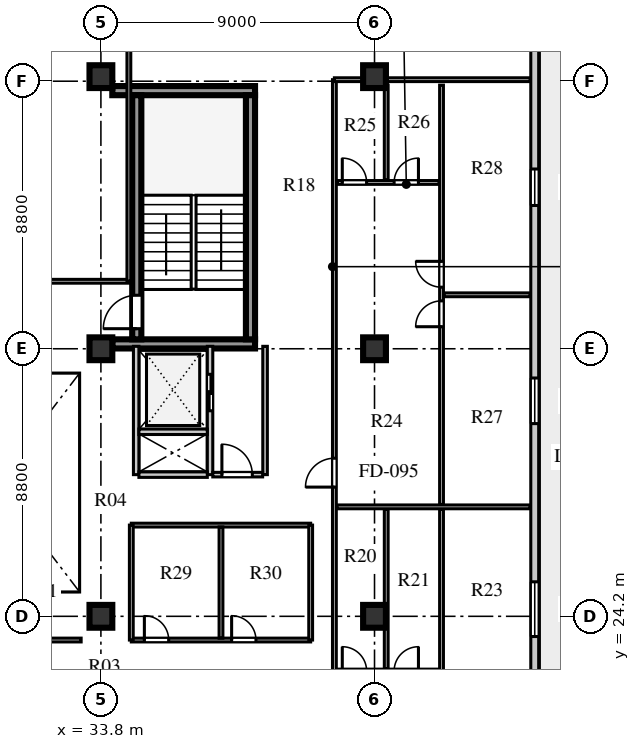
"""IFC4 building model, lengths in metres.
Left out: names, types, materials, properties, quantities, classifications, styles, units other than length and angle.
Written with IfcOpenShell. Run it as: python <this file> out.ifc"""

import sys

from ifc_helpers import new_model, si_unit, direction, frame, frame_2d, origin, origin_2d, place, context, subcontext, project, spatial, rectangle, extrude, element, fill, save


model = new_model("IFC4")
c1 = context("Model", 3, precision=1e-05, world=origin(), true_north=direction((0.0, 1.0)))
c2 = subcontext(c1, "Body", "Model", "MODEL_VIEW")
j1 = project(units=[si_unit("LENGTHUNIT", "METRE"), si_unit("PLANEANGLEUNIT", "RADIAN")], contexts=[c1])
p1 = place(None, origin())
s1 = spatial("IfcSite", under=j1, at=p1, CompositionType="ELEMENT")
p2 = place(p1, origin())
s2 = spatial("IfcBuilding", under=s1, at=p2, CompositionType="ELEMENT")
p3 = place(p2, frame((0.0, 0.0, 280.4)))
s3 = spatial("IfcBuildingStorey", under=s2, at=p3, CompositionType="ELEMENT", Elevation=280.4)
for number, where, z_axis, x_axis in (
    (1, (34.175, 33.16, 0.0), (0.0, 0.0, 1.0), (1.0, 0.0, 0.0)),
    (2, (34.175, 41.49, 0.0), (0.0, 0.0, 1.0), (1.0, 0.0, 0.0)),
):
    element("IfcWall", number, at=place(p3, frame(where, z_axis=z_axis, x_axis=x_axis)), inside=s3, PredefinedType="SHEAR", context=c2, shape_type="SweptSolid", body=[
        extrude(rectangle(XDim=4.695, YDim=0.3, at=frame_2d((2.348, 0.0))), origin(), (0.0, 0.0, 1.0), 3.66),
    ])
p4 = place(p3, frame((34.98, 33.31, 0.0), z_axis=(0.0, 0.0, 1.0), x_axis=(0.0, 1.0, 0.0)))
e3 = element("IfcWall", 3, at=p4, inside=s3, PredefinedType="SHEAR", context=c2, shape_type="SweptSolid", body=[
    extrude(rectangle(XDim=8.03, YDim=0.3, at=frame_2d((4.015, 0.0))), origin(), (0.0, 0.0, 1.0), 3.66),
])
p5 = place(p4, frame((0.35, 0.0, 0.0)))
e4 = element("IfcOpeningElement", 4, at=p5, cuts=e3, PredefinedType="OPENING", context=c2, shape_type="SweptSolid", body=[
    extrude(rectangle(XDim=1.1, YDim=2.1, at=frame_2d((0.55, 1.05))), frame((0.0, 0.16, 0.0), z_axis=(0.0, -1.0, 0.0), x_axis=(1.0, 0.0, 0.0)), (0.0, 0.0, 1.0), 0.32),
])
p6 = place(p3, frame((38.72, 33.31, 0.0), z_axis=(0.0, 0.0, 1.0), x_axis=(0.0, 1.0, 0.0)))
e5 = element("IfcWall", 5, at=p6, inside=s3, PredefinedType="SHEAR", context=c2, shape_type="SweptSolid", body=[
    extrude(rectangle(XDim=8.03, YDim=0.3, at=frame_2d((4.015, 0.0))), origin(), (0.0, 0.0, 1.0), 3.66),
])
for number, where, z_axis, x_axis in (
    (6, (33.8, 24.2, 0.0), (0.0, 0.0, 1.0), (1.0, 0.0, 0.0)),
    (7, (33.8, 33.0, 0.0), (0.0, 0.0, 1.0), (1.0, 0.0, 0.0)),
    (8, (33.8, 41.95, 0.0), (0.0, 0.0, 1.0), (1.0, 0.0, 0.0)),
    (9, (42.8, 24.2, 0.0), (0.0, 0.0, 1.0), (1.0, 0.0, 0.0)),
    (10, (42.8, 33.0, 0.0), (0.0, 0.0, 1.0), (1.0, 0.0, 0.0)),
    (11, (42.8, 41.95, 0.0), (0.0, 0.0, 1.0), (1.0, 0.0, 0.0)),
):
    element("IfcColumn", number, at=place(p3, frame(where, z_axis=z_axis, x_axis=x_axis)), inside=s3, PredefinedType="COLUMN", context=c2, shape_type="SweptSolid", body=[
        extrude(rectangle(XDim=0.75, YDim=0.75, at=origin_2d()), origin(), (0.0, 0.0, 1.0), 3.66),
    ])
p7 = place(p3, frame((48.07, 13.41, 0.0), z_axis=(0.0, 0.0, 1.0), x_axis=(0.0, 1.0, 0.0)))
e12 = element("IfcWall", 12, at=p7, inside=s3, PredefinedType="SOLIDWALL", context=c2, shape_type="SweptSolid", body=[
    extrude(rectangle(XDim=30.38, YDim=0.26, at=frame_2d((15.19, 0.0))), origin(), (0.0, 0.0, 1.0), 3.66),
])
p8 = place(p7, frame((2.43, 0.0, 0.0)))
e13 = element("IfcOpeningElement", 13, at=p8, cuts=e12, PredefinedType="OPENING", context=c2, shape_type="SweptSolid", body=[
    extrude(rectangle(XDim=1.0, YDim=2.05, at=frame_2d((0.5, 1.025))), frame((0.0, 0.14, 0.0), z_axis=(0.0, -1.0, 0.0), x_axis=(1.0, 0.0, 0.0)), (0.0, 0.0, 1.0), 0.28),
])
p9 = place(p7, frame((4.45, 0.0, 0.8)))
e14 = element("IfcOpeningElement", 14, at=p9, cuts=e12, PredefinedType="OPENING", context=c2, shape_type="SweptSolid", body=[
    extrude(rectangle(XDim=2.25, YDim=2.0, at=frame_2d((1.125, 1.0))), frame((0.0, 0.14, 0.0), z_axis=(0.0, -1.0, 0.0), x_axis=(1.0, 0.0, 0.0)), (0.0, 0.0, 1.0), 0.28),
])
p10 = place(p7, frame((10.125, 0.0, 0.8)))
e15 = element("IfcOpeningElement", 15, at=p10, cuts=e12, PredefinedType="OPENING", context=c2, shape_type="SweptSolid", body=[
    extrude(rectangle(XDim=1.8, YDim=2.0, at=frame_2d((0.9, 1.0))), frame((0.0, 0.14, 0.0), z_axis=(0.0, -1.0, 0.0), x_axis=(1.0, 0.0, 0.0)), (0.0, 0.0, 1.0), 0.28),
])
p11 = place(p7, frame((17.128, 0.0, 0.8)))
e16 = element("IfcOpeningElement", 16, at=p11, cuts=e12, PredefinedType="OPENING", context=c2, shape_type="SweptSolid", body=[
    extrude(rectangle(XDim=1.5, YDim=2.0, at=frame_2d((0.75, 1.0))), frame((0.0, 0.14, 0.0), z_axis=(0.0, -1.0, 0.0), x_axis=(1.0, 0.0, 0.0)), (0.0, 0.0, 1.0), 0.28),
])
p12 = place(p7, frame((24.302, 0.0, 0.8)))
e17 = element("IfcOpeningElement", 17, at=p12, cuts=e12, PredefinedType="OPENING", context=c2, shape_type="SweptSolid", body=[
    extrude(rectangle(XDim=1.2, YDim=1.75, at=frame_2d((0.6, 0.875))), frame((0.0, 0.14, 0.0), z_axis=(0.0, -1.0, 0.0), x_axis=(1.0, 0.0, 0.0)), (0.0, 0.0, 1.0), 0.28),
])
p13 = place(p3, frame((34.96, 28.86, 0.0), z_axis=(0.0, 0.0, 1.0), x_axis=(0.0, 1.0, 0.0)))
e18 = element("IfcWall", 18, at=p13, inside=s3, PredefinedType="SOLIDWALL", context=c2, shape_type="SweptSolid", body=[
    extrude(rectangle(XDim=4.22, YDim=0.18, at=frame_2d((2.11, 0.0))), origin(), (0.0, 0.0, 1.0), 3.66),
])
p14 = place(p3, frame((37.39, 28.86, 0.0), z_axis=(0.0, 0.0, 1.0), x_axis=(0.0, 1.0, 0.0)))
e19 = element("IfcWall", 19, at=p14, inside=s3, PredefinedType="SOLIDWALL", context=c2, shape_type="SweptSolid", body=[
    extrude(rectangle(XDim=4.22, YDim=0.18, at=frame_2d((2.11, 0.0))), origin(), (0.0, 0.0, 1.0), 3.66),
])
p15 = place(p14, frame((2.1, 0.0, 0.0)))
e20 = element("IfcOpeningElement", 20, at=p15, cuts=e19, PredefinedType="OPENING", context=c2, shape_type="SweptSolid", body=[
    extrude(rectangle(XDim=1.2, YDim=2.12, at=frame_2d((0.6, 1.06))), frame((0.0, 0.1, 0.0), z_axis=(0.0, -1.0, 0.0), x_axis=(1.0, 0.0, 0.0)), (0.0, 0.0, 1.0), 0.2),
])
for number, where, z_axis, x_axis in (
    (21, (35.05, 28.86, 0.0), (0.0, 0.0, 1.0), (1.0, 0.0, 0.0)),
    (22, (35.05, 30.27, 0.0), (0.0, 0.0, 1.0), (1.0, 0.0, 0.0)),
):
    element("IfcWall", number, at=place(p3, frame(where, z_axis=z_axis, x_axis=x_axis)), inside=s3, PredefinedType="SOLIDWALL", context=c2, shape_type="SweptSolid", body=[
        extrude(rectangle(XDim=2.25, YDim=0.18, at=frame_2d((1.125, 0.0))), origin(), (0.0, 0.0, 1.0), 3.66),
    ])
p16 = place(p3, frame((39.2, 28.86, 0.0), z_axis=(0.0, 0.0, 1.0), x_axis=(0.0, 1.0, 0.0)))
e23 = element("IfcWall", 23, at=p16, inside=s3, PredefinedType="PARTITIONING", context=c2, shape_type="SweptSolid", body=[
    extrude(rectangle(XDim=4.22, YDim=0.15, at=frame_2d((2.11, 0.0))), origin(), (0.0, 0.0, 1.0), 3.66),
])
p17 = place(p3, frame((37.48, 28.86, 0.0), z_axis=(0.0, 0.0, 1.0), x_axis=(1.0, 0.0, 0.0)))
e24 = element("IfcWall", 24, at=p17, inside=s3, PredefinedType="PARTITIONING", context=c2, shape_type="SweptSolid", body=[
    extrude(rectangle(XDim=1.64, YDim=0.15, at=frame_2d((0.82, 0.0))), origin(), (0.0, 0.0, 1.0), 3.66),
])
p18 = place(p17, frame((0.3, 0.0, 0.0)))
e25 = element("IfcOpeningElement", 25, at=p18, cuts=e24, PredefinedType="OPENING", context=c2, shape_type="SweptSolid", body=[
    extrude(rectangle(XDim=1.0, YDim=2.1, at=frame_2d((0.5, 1.05))), frame((0.0, 0.085, 0.0), z_axis=(0.0, -1.0, 0.0), x_axis=(1.0, 0.0, 0.0)), (0.0, 0.0, 1.0), 0.17),
])
p19 = place(p3, frame((27.15, 23.42, 0.0), z_axis=(0.0, 0.0, 1.0), x_axis=(1.0, 0.0, 0.0)))
e26 = element("IfcWall", 26, at=p19, inside=s3, PredefinedType="PLUMBINGWALL", context=c2, shape_type="SweptSolid", body=[
    extrude(rectangle(XDim=6.0, YDim=0.125, at=frame_2d((3.0, 0.0))), origin(), (0.0, 0.0, 1.0), 3.66),
])
p20 = place(p3, frame((25.22, 35.22, 0.0), z_axis=(0.0, 0.0, 1.0), x_axis=(1.0, 0.0, 0.0)))
e27 = element("IfcWall", 27, at=p20, inside=s3, PredefinedType="PLUMBINGWALL", context=c2, shape_type="SweptSolid", body=[
    extrude(rectangle(XDim=9.5, YDim=0.125, at=frame_2d((4.75, 0.0))), origin(), (0.0, 0.0, 1.0), 3.66),
])
p21 = place(p20, frame((1.8, 0.0, 0.0)))
e28 = element("IfcOpeningElement", 28, at=p21, cuts=e27, PredefinedType="OPENING", context=c2, shape_type="SweptSolid", body=[
    extrude(rectangle(XDim=1.1, YDim=2.08, at=frame_2d((0.55, 1.04))), frame((0.0, 0.073, 0.0), z_axis=(0.0, -1.0, 0.0), x_axis=(1.0, 0.0, 0.0)), (0.0, 0.0, 1.0), 0.145),
])
p22 = place(p3, frame((34.72, 35.22, 0.0), z_axis=(0.0, 0.0, 1.0), x_axis=(0.0, 1.0, 0.0)))
e29 = element("IfcWall", 29, at=p22, inside=s3, PredefinedType="PLUMBINGWALL", context=c2, shape_type="SweptSolid", body=[
    extrude(rectangle(XDim=11.6, YDim=0.125, at=frame_2d((5.8, 0.0))), origin(), (0.0, 0.0, 1.0), 3.66),
])
p23 = place(p3, frame((41.48, 15.35, 0.0), z_axis=(0.0, 0.0, 1.0), x_axis=(0.0, 1.0, 0.0)))
e30 = element("IfcWall", 30, at=p23, inside=s3, PredefinedType="PLUMBINGWALL", context=c2, shape_type="SweptSolid", body=[
    extrude(rectangle(XDim=26.5, YDim=0.125, at=frame_2d((13.25, 0.0))), origin(), (0.0, 0.0, 1.0), 3.66),
])
p24 = place(p23, frame((0.75, 0.0, 0.0)))
e31 = element("IfcOpeningElement", 31, at=p24, cuts=e30, PredefinedType="OPENING", context=c2, shape_type="SweptSolid", body=[
    extrude(rectangle(XDim=0.95, YDim=2.1, at=frame_2d((0.475, 1.05))), frame((0.0, 0.073, 0.0), z_axis=(0.0, -1.0, 0.0), x_axis=(1.0, 0.0, 0.0)), (0.0, 0.0, 1.0), 0.145),
])
p25 = place(p23, frame((13.1, 0.0, 0.0)))
e32 = element("IfcOpeningElement", 32, at=p25, cuts=e30, PredefinedType="OPENING", context=c2, shape_type="SweptSolid", body=[
    extrude(rectangle(XDim=0.95, YDim=2.1, at=frame_2d((0.475, 1.05))), frame((0.0, 0.073, 0.0), z_axis=(0.0, -1.0, 0.0), x_axis=(1.0, 0.0, 0.0)), (0.0, 0.0, 1.0), 0.145),
])
p26 = place(p3, frame((41.48, 41.85, 0.0), z_axis=(0.0, 0.0, 1.0), x_axis=(1.0, 0.0, 0.0)))
e33 = element("IfcWall", 33, at=p26, inside=s3, PredefinedType="PLUMBINGWALL", context=c2, shape_type="SweptSolid", body=[
    extrude(rectangle(XDim=6.44, YDim=0.125, at=frame_2d((3.22, 0.0))), origin(), (0.0, 0.0, 1.0), 3.06),
])
p27 = place(p3, frame((45.004, 15.53, 0.0), z_axis=(0.0, 0.0, 1.0), x_axis=(0.0, 1.0, 0.0)))
e34 = element("IfcWall", 34, at=p27, inside=s3, PredefinedType="PLUMBINGWALL", context=c2, shape_type="SweptSolid", body=[
    extrude(rectangle(XDim=12.19, YDim=0.125, at=frame_2d((6.095, 0.0))), origin(), (0.0, 0.0, 1.0), 3.66),
])
p28 = place(p27, frame((4.49, 0.0, 0.0)))
e35 = element("IfcOpeningElement", 35, at=p28, cuts=e34, PredefinedType="OPENING", context=c2, shape_type="SweptSolid", body=[
    extrude(rectangle(XDim=0.85, YDim=2.08, at=frame_2d((0.425, 1.04))), frame((0.0, 0.073, 0.0), z_axis=(0.0, -1.0, 0.0), x_axis=(1.0, 0.0, 0.0)), (0.0, 0.0, 1.0), 0.145),
])
p29 = place(p27, frame((5.79, 0.0, 0.0)))
e36 = element("IfcOpeningElement", 36, at=p29, cuts=e34, PredefinedType="OPENING", context=c2, shape_type="SweptSolid", body=[
    extrude(rectangle(XDim=0.85, YDim=2.08, at=frame_2d((0.425, 1.04))), frame((0.0, 0.073, 0.0), z_axis=(0.0, -1.0, 0.0), x_axis=(1.0, 0.0, 0.0)), (0.0, 0.0, 1.0), 0.145),
])
p30 = place(p3, frame((41.58, 22.4, 0.0), z_axis=(0.0, 0.0, 1.0), x_axis=(1.0, 0.0, 0.0)))
e37 = element("IfcWall", 37, at=p30, inside=s3, PredefinedType="PLUMBINGWALL", context=c2, shape_type="SweptSolid", body=[
    extrude(rectangle(XDim=3.344, YDim=0.125, at=frame_2d((1.672, 0.0))), origin(), (0.0, 0.0, 1.0), 3.66),
])
p31 = place(p30, frame((0.16, 0.0, 0.0)))
e38 = element("IfcOpeningElement", 38, at=p31, cuts=e37, PredefinedType="OPENING", context=c2, shape_type="SweptSolid", body=[
    extrude(rectangle(XDim=0.8, YDim=2.05, at=frame_2d((0.4, 1.025))), frame((0.0, 0.073, 0.0), z_axis=(0.0, -1.0, 0.0), x_axis=(1.0, 0.0, 0.0)), (0.0, 0.0, 1.0), 0.145),
])
p32 = place(p30, frame((1.865, 0.0, 0.0)))
e39 = element("IfcOpeningElement", 39, at=p32, cuts=e37, PredefinedType="OPENING", context=c2, shape_type="SweptSolid", body=[
    extrude(rectangle(XDim=0.8, YDim=2.05, at=frame_2d((0.4, 1.025))), frame((0.0, 0.073, 0.0), z_axis=(0.0, -1.0, 0.0), x_axis=(1.0, 0.0, 0.0)), (0.0, 0.0, 1.0), 0.145),
])
p33 = place(p3, frame((43.185, 22.48, 0.0), z_axis=(0.0, 0.0, 1.0), x_axis=(0.0, 1.0, 0.0)))
e40 = element("IfcWall", 40, at=p33, inside=s3, PredefinedType="PLUMBINGWALL", context=c2, shape_type="SweptSolid", body=[
    extrude(rectangle(XDim=5.24, YDim=0.125, at=frame_2d((2.62, 0.0))), origin(), (0.0, 0.0, 1.0), 3.66),
])
p34 = place(p3, frame((41.56, 27.8, 0.0), z_axis=(0.0, 0.0, 1.0), x_axis=(1.0, 0.0, 0.0)))
e41 = element("IfcWall", 41, at=p34, inside=s3, PredefinedType="PLUMBINGWALL", context=c2, shape_type="SweptSolid", body=[
    extrude(rectangle(XDim=6.36, YDim=0.125, at=frame_2d((3.18, 0.0))), origin(), (0.0, 0.0, 1.0), 3.66),
])
p35 = place(p3, frame((45.004, 27.88, 0.0), z_axis=(0.0, 0.0, 1.0), x_axis=(0.0, 1.0, 0.0)))
e42 = element("IfcWall", 42, at=p35, inside=s3, PredefinedType="PLUMBINGWALL", context=c2, shape_type="SweptSolid", body=[
    extrude(rectangle(XDim=13.79, YDim=0.125, at=frame_2d((6.895, 0.0))), origin(), (0.0, 0.0, 1.0), 3.66),
])
p36 = place(p35, frame((5.845, 0.0, 0.0)))
e43 = element("IfcOpeningElement", 43, at=p36, cuts=e42, PredefinedType="OPENING", context=c2, shape_type="SweptSolid", body=[
    extrude(rectangle(XDim=0.85, YDim=2.08, at=frame_2d((0.425, 1.04))), frame((0.0, 0.073, 0.0), z_axis=(0.0, -1.0, 0.0), x_axis=(1.0, 0.0, 0.0)), (0.0, 0.0, 1.0), 0.145),
])
p37 = place(p35, frame((7.145, 0.0, 0.0)))
e44 = element("IfcOpeningElement", 44, at=p37, cuts=e42, PredefinedType="OPENING", context=c2, shape_type="SweptSolid", body=[
    extrude(rectangle(XDim=0.85, YDim=2.08, at=frame_2d((0.425, 1.04))), frame((0.0, 0.073, 0.0), z_axis=(0.0, -1.0, 0.0), x_axis=(1.0, 0.0, 0.0)), (0.0, 0.0, 1.0), 0.145),
])
p38 = place(p3, frame((41.58, 38.47, 0.0), z_axis=(0.0, 0.0, 1.0), x_axis=(1.0, 0.0, 0.0)))
e45 = element("IfcWall", 45, at=p38, inside=s3, PredefinedType="PLUMBINGWALL", context=c2, shape_type="SweptSolid", body=[
    extrude(rectangle(XDim=3.344, YDim=0.125, at=frame_2d((1.672, 0.0))), origin(), (0.0, 0.0, 1.0), 3.66),
])
p39 = place(p38, frame((0.16, 0.0, 0.0)))
e46 = element("IfcOpeningElement", 46, at=p39, cuts=e45, PredefinedType="OPENING", context=c2, shape_type="SweptSolid", body=[
    extrude(rectangle(XDim=0.8, YDim=2.05, at=frame_2d((0.4, 1.025))), frame((0.0, 0.073, 0.0), z_axis=(0.0, -1.0, 0.0), x_axis=(1.0, 0.0, 0.0)), (0.0, 0.0, 1.0), 0.145),
])
p40 = place(p38, frame((1.865, 0.0, 0.0)))
e47 = element("IfcOpeningElement", 47, at=p40, cuts=e45, PredefinedType="OPENING", context=c2, shape_type="SweptSolid", body=[
    extrude(rectangle(XDim=0.8, YDim=2.05, at=frame_2d((0.4, 1.025))), frame((0.0, 0.073, 0.0), z_axis=(0.0, -1.0, 0.0), x_axis=(1.0, 0.0, 0.0)), (0.0, 0.0, 1.0), 0.145),
])
p41 = place(p3, frame((43.185, 38.55, 0.0), z_axis=(0.0, 0.0, 1.0), x_axis=(0.0, 1.0, 0.0)))
e48 = element("IfcWall", 48, at=p41, inside=s3, PredefinedType="PLUMBINGWALL", context=c2, shape_type="SweptSolid", body=[
    extrude(rectangle(XDim=3.12, YDim=0.125, at=frame_2d((1.56, 0.0))), origin(), (0.0, 0.0, 1.0), 3.66),
])
p42 = place(p3, frame((45.084, 34.775, 0.0), z_axis=(0.0, 0.0, 1.0), x_axis=(1.0, 0.0, 0.0)))
e49 = element("IfcWall", 49, at=p42, inside=s3, PredefinedType="PLUMBINGWALL", context=c2, shape_type="SweptSolid", body=[
    extrude(rectangle(XDim=2.836, YDim=0.125, at=frame_2d((1.418, 0.0))), origin(), (0.0, 0.0, 1.0), 3.66),
])
p43 = place(p3, frame((34.8, 23.42, 0.0), z_axis=(0.0, 0.0, 1.0), x_axis=(1.0, 0.0, 0.0)))
e50 = element("IfcWall", 50, at=p43, inside=s3, PredefinedType="PLUMBINGWALL", context=c2, shape_type="SweptSolid", body=[
    extrude(rectangle(XDim=5.9, YDim=0.125, at=frame_2d((2.95, 0.0))), origin(), (0.0, 0.0, 1.0), 3.66),
])
p44 = place(p43, frame((0.43, 0.0, 0.0)))
e51 = element("IfcOpeningElement", 51, at=p44, cuts=e50, PredefinedType="OPENING", context=c2, shape_type="SweptSolid", body=[
    extrude(rectangle(XDim=0.8, YDim=2.05, at=frame_2d((0.4, 1.025))), frame((0.0, 0.073, 0.0), z_axis=(0.0, -1.0, 0.0), x_axis=(1.0, 0.0, 0.0)), (0.0, 0.0, 1.0), 0.145),
])
p45 = place(p43, frame((3.3, 0.0, 0.0)))
e52 = element("IfcOpeningElement", 52, at=p45, cuts=e50, PredefinedType="OPENING", context=c2, shape_type="SweptSolid", body=[
    extrude(rectangle(XDim=0.8, YDim=2.05, at=frame_2d((0.4, 1.025))), frame((0.0, 0.073, 0.0), z_axis=(0.0, -1.0, 0.0), x_axis=(1.0, 0.0, 0.0)), (0.0, 0.0, 1.0), 0.145),
])
p46 = place(p3, frame((34.8, 27.2, 0.0), z_axis=(0.0, 0.0, 1.0), x_axis=(1.0, 0.0, 0.0)))
e53 = element("IfcWall", 53, at=p46, inside=s3, PredefinedType="PLUMBINGWALL", context=c2, shape_type="SweptSolid", body=[
    extrude(rectangle(XDim=5.9, YDim=0.125, at=frame_2d((2.95, 0.0))), origin(), (0.0, 0.0, 1.0), 3.36),
])
for number, where, z_axis, x_axis in (
    (54, (34.8, 23.42, 0.0), (0.0, 0.0, 1.0), (0.0, 1.0, 0.0)),
    (55, (40.7, 23.42, 0.0), (0.0, 0.0, 1.0), (0.0, 1.0, 0.0)),
):
    element("IfcWall", number, at=place(p3, frame(where, z_axis=z_axis, x_axis=x_axis)), inside=s3, PredefinedType="PLUMBINGWALL", context=c2, shape_type="SweptSolid", body=[
        extrude(rectangle(XDim=3.78, YDim=0.125, at=frame_2d((1.89, 0.0))), origin(), (0.0, 0.0, 1.0), 3.66),
    ])
p47 = place(p3, frame((37.75, 23.48, 0.0), z_axis=(0.0, 0.0, 1.0), x_axis=(0.0, 1.0, 0.0)))
e56 = element("IfcWall", 56, at=p47, inside=s3, PredefinedType="PLUMBINGWALL", context=c2, shape_type="SweptSolid", body=[
    extrude(rectangle(XDim=3.66, YDim=0.125, at=frame_2d((1.83, 0.0))), origin(), (0.0, 0.0, 1.0), 3.66),
])
p48 = place(p10, origin())
e57 = element("IfcWindow", 57, at=p48, inside=s3, PartitioningType="SINGLE_PANEL", PredefinedType="WINDOW", context=c2, shape_type="SweptSolid", body=[
    extrude(rectangle(XDim=1.8, YDim=2.0, at=frame_2d((0.9, 1.0))), frame((0.0, 0.03, 0.0), z_axis=(0.0, -1.0, 0.0), x_axis=(1.0, 0.0, 0.0)), (0.0, 0.0, 1.0), 0.06),
])
fill(e15, e57)
p49 = place(p11, origin())
e58 = element("IfcWindow", 58, at=p49, inside=s3, PartitioningType="SINGLE_PANEL", PredefinedType="WINDOW", context=c2, shape_type="SweptSolid", body=[
    extrude(rectangle(XDim=1.5, YDim=2.0, at=frame_2d((0.75, 1.0))), frame((0.0, 0.03, 0.0), z_axis=(0.0, -1.0, 0.0), x_axis=(1.0, 0.0, 0.0)), (0.0, 0.0, 1.0), 0.06),
])
fill(e16, e58)
p50 = place(p12, origin())
e59 = element("IfcWindow", 59, at=p50, inside=s3, PartitioningType="SINGLE_PANEL", PredefinedType="WINDOW", context=c2, shape_type="SweptSolid", body=[
    extrude(rectangle(XDim=1.2, YDim=1.75, at=frame_2d((0.6, 0.875))), frame((0.0, 0.03, 0.0), z_axis=(0.0, -1.0, 0.0), x_axis=(1.0, 0.0, 0.0)), (0.0, 0.0, 1.0), 0.06),
])
fill(e17, e59)
p51 = place(p5, origin())
e60 = element("IfcDoor", 60, at=p51, inside=s3, OperationType="SINGLE_SWING_LEFT", PredefinedType="DOOR", context=c2, shape_type="SweptSolid", body=[
    extrude(rectangle(XDim=1.1, YDim=2.1, at=frame_2d((0.55, 1.05))), frame((0.0, 0.025, 0.0), z_axis=(0.0, -1.0, 0.0), x_axis=(1.0, 0.0, 0.0)), (0.0, 0.0, 1.0), 0.05),
])
fill(e4, e60)
p52 = place(p15, frame((1.2, 0.0, 0.0), z_axis=(0.0, 0.0, 1.0), x_axis=(-1.0, 0.0, 0.0)))
e61 = element("IfcDoor", 61, at=p52, inside=s3, OperationType="DOUBLE_DOOR_SLIDING", PredefinedType="DOOR", context=c2, shape_type="SweptSolid", body=[
    extrude(rectangle(XDim=1.2, YDim=2.12, at=frame_2d((0.6, 1.06))), frame((0.0, 0.025, 0.0), z_axis=(0.0, -1.0, 0.0), x_axis=(1.0, 0.0, 0.0)), (0.0, 0.0, 1.0), 0.05),
])
fill(e20, e61)
p53 = place(p18, origin())
e62 = element("IfcDoor", 62, at=p53, inside=s3, OperationType="SINGLE_SWING_LEFT", PredefinedType="DOOR", context=c2, shape_type="SweptSolid", body=[
    extrude(rectangle(XDim=1.0, YDim=2.1, at=frame_2d((0.5, 1.05))), frame((0.0, 0.025, 0.0), z_axis=(0.0, -1.0, 0.0), x_axis=(1.0, 0.0, 0.0)), (0.0, 0.0, 1.0), 0.05),
])
fill(e25, e62)
p54 = place(p39, origin())
e63 = element("IfcDoor", 63, at=p54, inside=s3, OperationType="SINGLE_SWING_LEFT", PredefinedType="DOOR", context=c2, shape_type="SweptSolid", body=[
    extrude(rectangle(XDim=0.8, YDim=2.05, at=frame_2d((0.4, 1.025))), frame((0.0, 0.025, 0.0), z_axis=(0.0, -1.0, 0.0), x_axis=(1.0, 0.0, 0.0)), (0.0, 0.0, 1.0), 0.05),
])
fill(e46, e63)
p55 = place(p40, origin())
e64 = element("IfcDoor", 64, at=p55, inside=s3, OperationType="SINGLE_SWING_RIGHT", PredefinedType="DOOR", context=c2, shape_type="SweptSolid", body=[
    extrude(rectangle(XDim=0.8, YDim=2.05, at=frame_2d((0.4, 1.025))), frame((0.0, 0.025, 0.0), z_axis=(0.0, -1.0, 0.0), x_axis=(1.0, 0.0, 0.0)), (0.0, 0.0, 1.0), 0.05),
])
fill(e47, e64)
p56 = place(p36, origin())
e65 = element("IfcDoor", 65, at=p56, inside=s3, OperationType="SINGLE_SWING_LEFT", PredefinedType="DOOR", context=c2, shape_type="SweptSolid", body=[
    extrude(rectangle(XDim=0.85, YDim=2.08, at=frame_2d((0.425, 1.04))), frame((0.0, 0.025, 0.0), z_axis=(0.0, -1.0, 0.0), x_axis=(1.0, 0.0, 0.0)), (0.0, 0.0, 1.0), 0.05),
])
fill(e43, e65)
p57 = place(p37, origin())
e66 = element("IfcDoor", 66, at=p57, inside=s3, OperationType="SINGLE_SWING_RIGHT", PredefinedType="DOOR", context=c2, shape_type="SweptSolid", body=[
    extrude(rectangle(XDim=0.85, YDim=2.08, at=frame_2d((0.425, 1.04))), frame((0.0, 0.025, 0.0), z_axis=(0.0, -1.0, 0.0), x_axis=(1.0, 0.0, 0.0)), (0.0, 0.0, 1.0), 0.05),
])
fill(e44, e66)
p58 = place(p25, origin())
e67 = element("IfcDoor", 67, at=p58, inside=s3, OperationType="SINGLE_SWING_LEFT", PredefinedType="DOOR", context=c2, shape_type="SweptSolid", body=[
    extrude(rectangle(XDim=0.95, YDim=2.1, at=frame_2d((0.475, 1.05))), frame((0.0, 0.025, 0.0), z_axis=(0.0, -1.0, 0.0), x_axis=(1.0, 0.0, 0.0)), (0.0, 0.0, 1.0), 0.05),
])
fill(e32, e67)
p59 = place(p44, origin())
e68 = element("IfcDoor", 68, at=p59, inside=s3, OperationType="SINGLE_SWING_LEFT", PredefinedType="DOOR", context=c2, shape_type="SweptSolid", body=[
    extrude(rectangle(XDim=0.8, YDim=2.05, at=frame_2d((0.4, 1.025))), frame((0.0, 0.025, 0.0), z_axis=(0.0, -1.0, 0.0), x_axis=(1.0, 0.0, 0.0)), (0.0, 0.0, 1.0), 0.05),
])
fill(e51, e68)
p60 = place(p45, origin())
e69 = element("IfcDoor", 69, at=p60, inside=s3, OperationType="SINGLE_SWING_LEFT", PredefinedType="DOOR", context=c2, shape_type="SweptSolid", body=[
    extrude(rectangle(XDim=0.8, YDim=2.05, at=frame_2d((0.4, 1.025))), frame((0.0, 0.025, 0.0), z_axis=(0.0, -1.0, 0.0), x_axis=(1.0, 0.0, 0.0)), (0.0, 0.0, 1.0), 0.05),
])
fill(e52, e69)
save(model, sys.argv[1])
